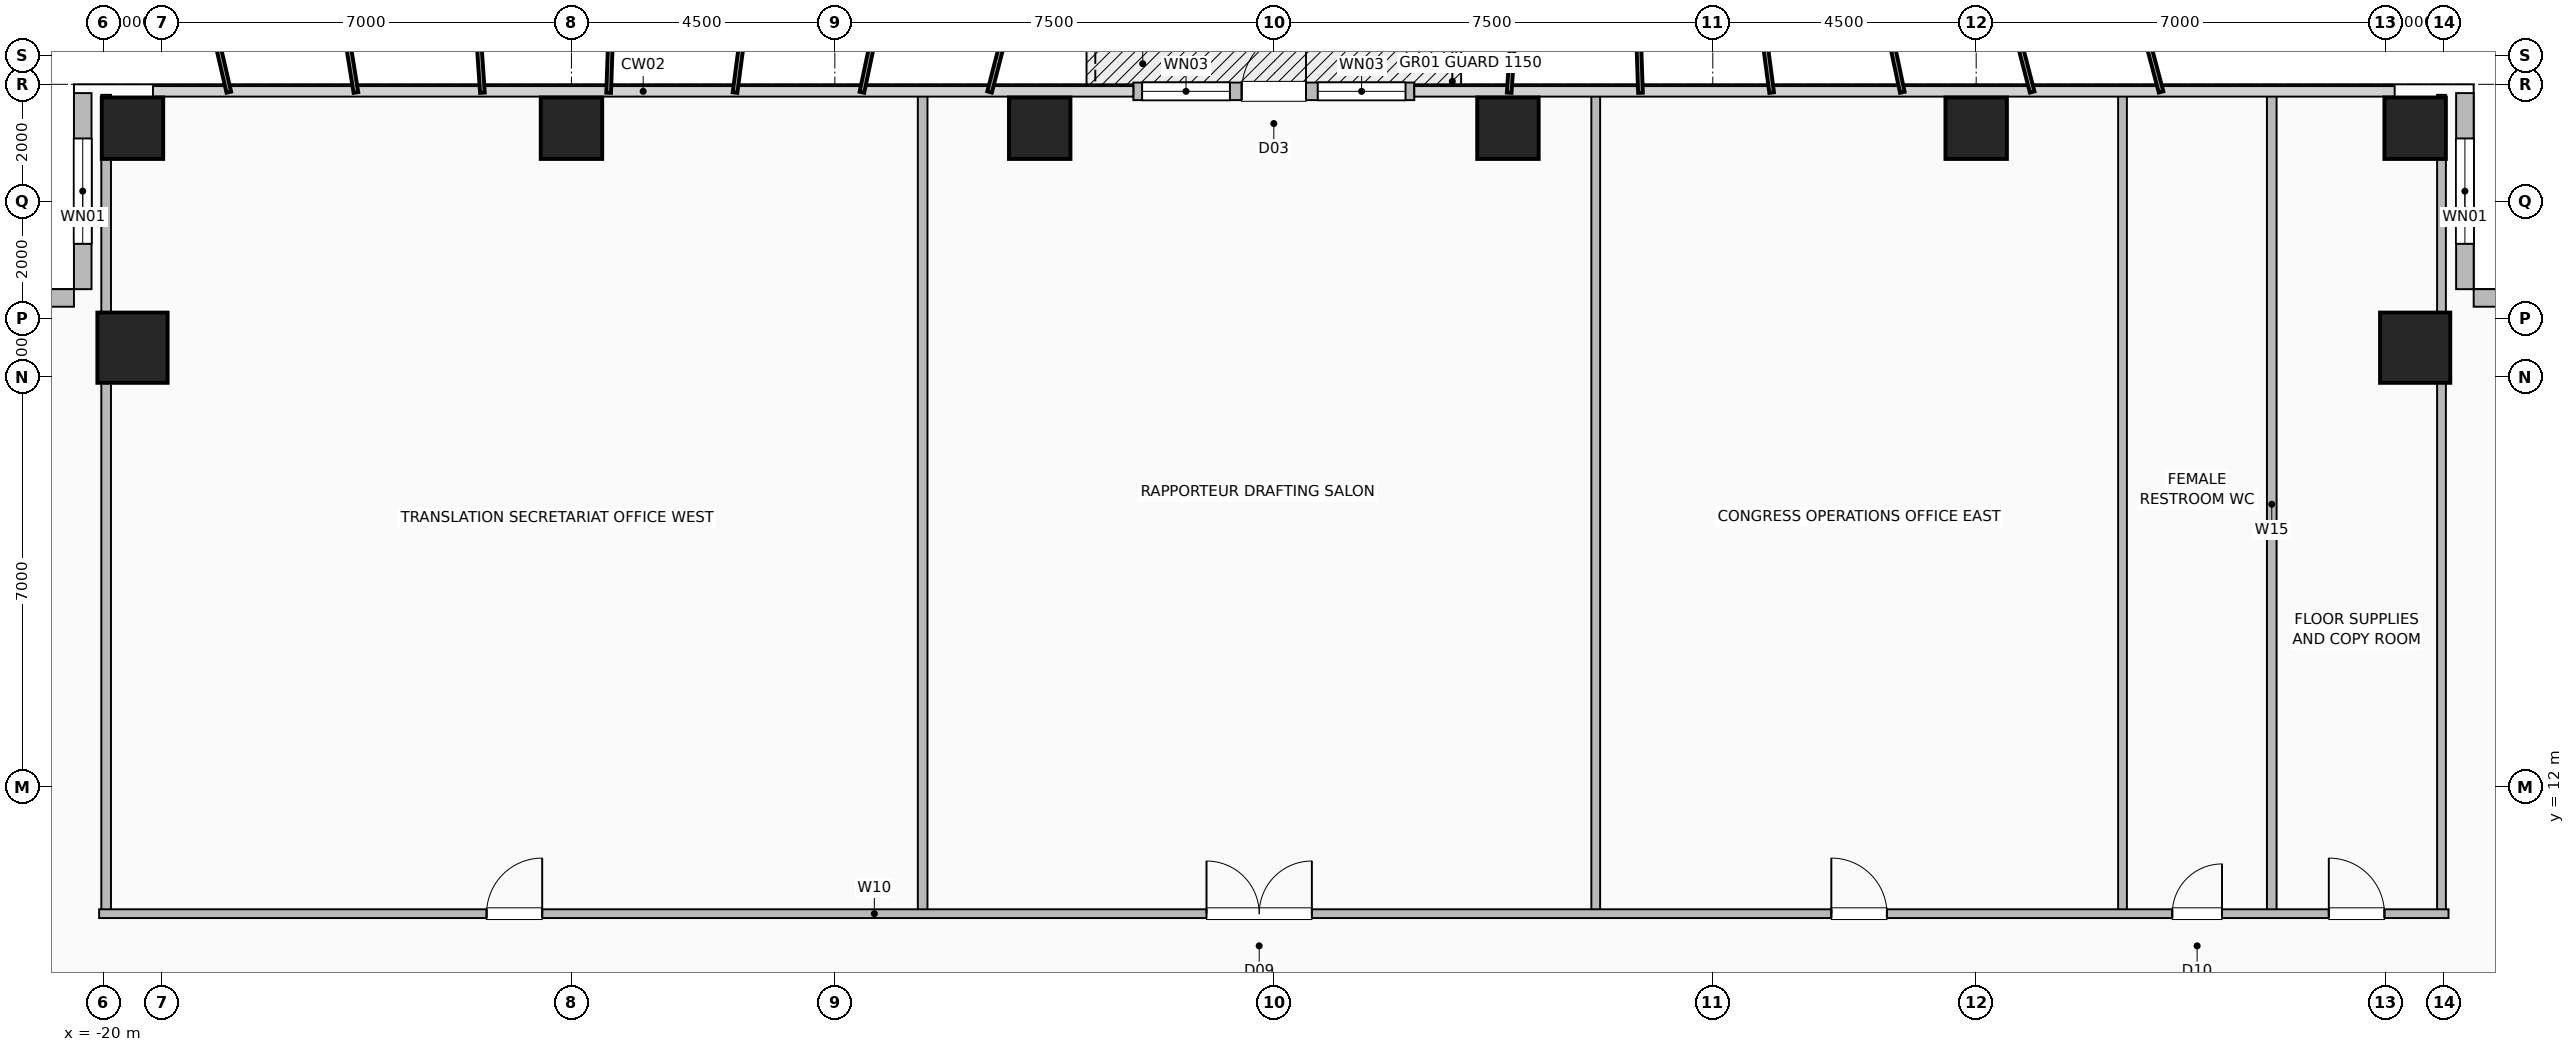
"""IFC4 building model, lengths in metres.
Left out: names, types, materials, properties, quantities, classifications, styles, units other than length and angle.
Written with IfcOpenShell. Run it as: python <this file> out.ifc"""

import sys

from ifc_helpers import new_model, si_unit, direction, frame, frame_2d, origin, origin_2d, place, context, subcontext, project, spatial, rectangle, hollow_rectangle, extrude, element, fill, save


model = new_model("IFC4")
c1 = context("Model", 3, precision=1e-05, world=origin(), true_north=direction((0.0, 1.0)))
c2 = subcontext(c1, "Body", "Model", "MODEL_VIEW")
j1 = project(units=[si_unit("LENGTHUNIT", "METRE"), si_unit("PLANEANGLEUNIT", "RADIAN")], contexts=[c1])
p1 = place(None, origin())
s1 = spatial("IfcSite", under=j1, at=p1, CompositionType="ELEMENT")
p2 = place(p1, origin())
s2 = spatial("IfcBuilding", under=s1, at=p2, CompositionType="ELEMENT")
p3 = place(p2, frame((0.0, 0.0, 37.5)))
s3 = spatial("IfcBuildingStorey", under=s2, at=p3, CompositionType="ELEMENT", Elevation=37.5)
for number, where, z_axis, x_axis in (
    (1, (-19.5, 23.25, 0.0), (0.0, 0.0, 1.0), (1.0, 0.0, 0.0)),
    (2, (-12.0, 23.25, 0.0), (0.0, 0.0, 1.0), (1.0, 0.0, 0.0)),
    (3, (-4.0, 23.25, 0.0), (0.0, 0.0, 1.0), (1.0, 0.0, 0.0)),
    (4, (4.0, 23.25, 0.0), (0.0, 0.0, 1.0), (1.0, 0.0, 0.0)),
    (5, (12.0, 23.25, 0.0), (0.0, 0.0, 1.0), (1.0, 0.0, 0.0)),
    (6, (19.5, 23.25, 0.0), (0.0, 0.0, 1.0), (1.0, 0.0, 0.0)),
):
    element("IfcColumn", number, at=place(p3, frame(where, z_axis=z_axis, x_axis=x_axis)), inside=s3, PredefinedType="COLUMN", context=c2, shape_type="SweptSolid", body=[
        extrude(hollow_rectangle(XDim=1.05, YDim=1.05, WallThickness=0.05, at=origin_2d()), origin(), (0.0, 0.0, 1.0), 3.5),
    ])
for number, where, z_axis, x_axis in (
    (7, (19.5, 19.5, 0.0), (0.0, 0.0, 1.0), (1.0, 0.0, 0.0)),
    (8, (-19.5, 19.5, 0.0), (0.0, 0.0, 1.0), (1.0, 0.0, 0.0)),
):
    element("IfcColumn", number, at=place(p3, frame(where, z_axis=z_axis, x_axis=x_axis)), inside=s3, PredefinedType="COLUMN", context=c2, shape_type="SweptSolid", body=[
        extrude(hollow_rectangle(XDim=1.2, YDim=1.2, WallThickness=0.055, at=origin_2d()), origin(), (0.0, 0.0, 1.0), 3.5),
    ])
p4 = place(p3, frame((-2.4, 23.88, 0.0), z_axis=(0.0, 0.0, 1.0), x_axis=(1.0, 0.0, 0.0)))
e9 = element("IfcWall", 9, at=p4, inside=s3, PredefinedType="SOLIDWALL", context=c2, shape_type="SweptSolid", body=[
    extrude(rectangle(XDim=4.8, YDim=0.3, at=frame_2d((2.4, 0.0))), origin(), (0.0, 0.0, 1.0), 3.25),
])
p5 = place(p4, frame((1.85, 0.0, 0.0)))
e10 = element("IfcOpeningElement", 10, at=p5, cuts=e9, PredefinedType="OPENING", context=c2, shape_type="SweptSolid", body=[
    extrude(rectangle(XDim=1.1, YDim=2.2, at=frame_2d((0.55, 1.1))), frame((0.0, 0.16, 0.0), z_axis=(0.0, -1.0, 0.0), x_axis=(1.0, 0.0, 0.0)), (0.0, 0.0, 1.0), 0.32),
])
p6 = place(p4, frame((0.15, 0.0, 0.85)))
e11 = element("IfcOpeningElement", 11, at=p6, cuts=e9, PredefinedType="OPENING", context=c2, shape_type="SweptSolid", body=[
    extrude(rectangle(XDim=1.5, YDim=1.8, at=frame_2d((0.75, 0.9))), frame((0.0, 0.16, 0.0), z_axis=(0.0, -1.0, 0.0), x_axis=(1.0, 0.0, 0.0)), (0.0, 0.0, 1.0), 0.32),
])
p7 = place(p4, frame((3.15, 0.0, 0.85)))
e12 = element("IfcOpeningElement", 12, at=p7, cuts=e9, PredefinedType="OPENING", context=c2, shape_type="SweptSolid", body=[
    extrude(rectangle(XDim=1.5, YDim=1.8, at=frame_2d((0.75, 0.9))), frame((0.0, 0.16, 0.0), z_axis=(0.0, -1.0, 0.0), x_axis=(1.0, 0.0, 0.0)), (0.0, 0.0, 1.0), 0.32),
])
p8 = place(p3, frame((20.35, 23.85, 0.0), z_axis=(0.0, 0.0, 1.0), x_axis=(0.0, -1.0, 0.0)))
e13 = element("IfcWall", 13, at=p8, inside=s3, PredefinedType="SOLIDWALL", context=c2, shape_type="SweptSolid", body=[
    extrude(rectangle(XDim=3.35, YDim=0.3, at=frame_2d((1.675, 0.0))), origin(), (0.0, 0.0, 1.0), 3.25),
])
p9 = place(p8, frame((0.775, 0.0, 0.9)))
e14 = element("IfcOpeningElement", 14, at=p9, cuts=e13, PredefinedType="OPENING", context=c2, shape_type="SweptSolid", body=[
    extrude(rectangle(XDim=1.8, YDim=1.8, at=frame_2d((0.9, 0.9))), frame((0.0, 0.16, 0.0), z_axis=(0.0, -1.0, 0.0), x_axis=(1.0, 0.0, 0.0)), (0.0, 0.0, 1.0), 0.32),
])
p10 = place(p3, frame((23.85, 20.35, 0.0), z_axis=(0.0, 0.0, 1.0), x_axis=(-1.0, 0.0, 0.0)))
e15 = element("IfcWall", 15, at=p10, inside=s3, PredefinedType="SOLIDWALL", context=c2, shape_type="SweptSolid", body=[
    extrude(rectangle(XDim=3.35, YDim=0.3, at=frame_2d((1.675, 0.0))), origin(), (0.0, 0.0, 1.0), 3.25),
])
p11 = place(p3, frame((-20.35, 23.85, 0.0), z_axis=(0.0, 0.0, 1.0), x_axis=(0.0, -1.0, 0.0)))
e16 = element("IfcWall", 16, at=p11, inside=s3, PredefinedType="SOLIDWALL", context=c2, shape_type="SweptSolid", body=[
    extrude(rectangle(XDim=3.35, YDim=0.3, at=frame_2d((1.675, 0.0))), origin(), (0.0, 0.0, 1.0), 3.25),
])
p12 = place(p11, frame((0.775, 0.0, 0.9)))
e17 = element("IfcOpeningElement", 17, at=p12, cuts=e16, PredefinedType="OPENING", context=c2, shape_type="SweptSolid", body=[
    extrude(rectangle(XDim=1.8, YDim=1.8, at=frame_2d((0.9, 0.9))), frame((0.0, 0.16, 0.0), z_axis=(0.0, -1.0, 0.0), x_axis=(1.0, 0.0, 0.0)), (0.0, 0.0, 1.0), 0.32),
])
p13 = place(p3, frame((-23.85, 20.35, 0.0), z_axis=(0.0, 0.0, 1.0), x_axis=(1.0, 0.0, 0.0)))
e18 = element("IfcWall", 18, at=p13, inside=s3, PredefinedType="SOLIDWALL", context=c2, shape_type="SweptSolid", body=[
    extrude(rectangle(XDim=3.35, YDim=0.3, at=frame_2d((1.675, 0.0))), origin(), (0.0, 0.0, 1.0), 3.25),
])
for number, where, z_axis, x_axis in (
    (19, (17.05, 9.83, 0.0), (0.0, 0.0, 1.0), (0.0, 1.0, 0.0)),
    (20, (-19.95, 9.83, 0.0), (0.0, 0.0, 1.0), (0.0, 1.0, 0.0)),
    (21, (-6.0, 9.83, 0.0), (0.0, 0.0, 1.0), (0.0, 1.0, 0.0)),
):
    element("IfcWall", number, at=place(p3, frame(where, z_axis=z_axis, x_axis=x_axis)), inside=s3, PredefinedType="PLUMBINGWALL", context=c2, shape_type="SweptSolid", body=[
        extrude(rectangle(XDim=13.99, YDim=0.165, at=frame_2d((6.995, 0.0))), origin(), (0.0, 0.0, 1.0), 3.25),
    ])
for number, where, z_axis, x_axis in (
    (22, (5.5, 9.83, 0.0), (0.0, 0.0, 1.0), (0.0, 1.0, 0.0)),
    (23, (14.5, 9.83, 0.0), (0.0, 0.0, 1.0), (0.0, 1.0, 0.0)),
    (24, (19.95, 9.83, 0.0), (0.0, 0.0, 1.0), (0.0, 1.0, 0.0)),
):
    element("IfcWall", number, at=place(p3, frame(where, z_axis=z_axis, x_axis=x_axis)), inside=s3, PredefinedType="PARTITIONING", context=c2, shape_type="SweptSolid", body=[
        extrude(rectangle(XDim=13.99, YDim=0.15, at=frame_2d((6.995, 0.0))), origin(), (0.0, 0.0, 1.0), 3.25),
    ])
p14 = place(p3, frame((-20.07, 9.83, 0.0), z_axis=(0.0, 0.0, 1.0), x_axis=(1.0, 0.0, 0.0)))
e25 = element("IfcWall", 25, at=p14, inside=s3, PredefinedType="PARTITIONING", context=c2, shape_type="SweptSolid", body=[
    extrude(rectangle(XDim=40.14, YDim=0.15, at=frame_2d((20.07, 0.0))), origin(), (0.0, 0.0, 1.0), 3.25),
])
p15 = place(p14, frame((6.62, 0.0, 0.0)))
e26 = element("IfcOpeningElement", 26, at=p15, cuts=e25, PredefinedType="OPENING", context=c2, shape_type="SweptSolid", body=[
    extrude(rectangle(XDim=0.95, YDim=2.06, at=frame_2d((0.475, 1.03))), frame((0.0, 0.085, 0.0), z_axis=(0.0, -1.0, 0.0), x_axis=(1.0, 0.0, 0.0)), (0.0, 0.0, 1.0), 0.17),
])
p16 = place(p14, frame((18.92, 0.0, 0.0)))
e27 = element("IfcOpeningElement", 27, at=p16, cuts=e25, PredefinedType="OPENING", context=c2, shape_type="SweptSolid", body=[
    extrude(rectangle(XDim=1.8, YDim=2.08, at=frame_2d((0.9, 1.04))), frame((0.0, 0.085, 0.0), z_axis=(0.0, -1.0, 0.0), x_axis=(1.0, 0.0, 0.0)), (0.0, 0.0, 1.0), 0.17),
])
p17 = place(p14, frame((29.595, 0.0, 0.0)))
e28 = element("IfcOpeningElement", 28, at=p17, cuts=e25, PredefinedType="OPENING", context=c2, shape_type="SweptSolid", body=[
    extrude(rectangle(XDim=0.95, YDim=2.06, at=frame_2d((0.475, 1.03))), frame((0.0, 0.085, 0.0), z_axis=(0.0, -1.0, 0.0), x_axis=(1.0, 0.0, 0.0)), (0.0, 0.0, 1.0), 0.17),
])
p18 = place(p14, frame((35.42, 0.0, 0.0)))
e29 = element("IfcOpeningElement", 29, at=p18, cuts=e25, PredefinedType="OPENING", context=c2, shape_type="SweptSolid", body=[
    extrude(rectangle(XDim=0.85, YDim=2.05, at=frame_2d((0.425, 1.025))), frame((0.0, 0.085, 0.0), z_axis=(0.0, -1.0, 0.0), x_axis=(1.0, 0.0, 0.0)), (0.0, 0.0, 1.0), 0.17),
])
p19 = place(p14, frame((38.095, 0.0, 0.0)))
e30 = element("IfcOpeningElement", 30, at=p19, cuts=e25, PredefinedType="OPENING", context=c2, shape_type="SweptSolid", body=[
    extrude(rectangle(XDim=0.95, YDim=2.06, at=frame_2d((0.475, 1.03))), frame((0.0, 0.085, 0.0), z_axis=(0.0, -1.0, 0.0), x_axis=(1.0, 0.0, 0.0)), (0.0, 0.0, 1.0), 0.17),
])
p20 = place(p5, origin())
e31 = element("IfcDoor", 31, at=p20, inside=s3, OperationType="SINGLE_SWING_RIGHT", PredefinedType="DOOR", context=c2, shape_type="SweptSolid", body=[
    extrude(rectangle(XDim=1.1, YDim=2.2, at=frame_2d((0.55, 1.1))), frame((0.0, 0.025, 0.0), z_axis=(0.0, -1.0, 0.0), x_axis=(1.0, 0.0, 0.0)), (0.0, 0.0, 1.0), 0.05),
])
fill(e10, e31)
p21 = place(p6, origin())
e32 = element("IfcWindow", 32, at=p21, inside=s3, PartitioningType="SINGLE_PANEL", PredefinedType="WINDOW", context=c2, shape_type="SweptSolid", body=[
    extrude(rectangle(XDim=1.5, YDim=1.8, at=frame_2d((0.75, 0.9))), frame((0.0, 0.03, 0.0), z_axis=(0.0, -1.0, 0.0), x_axis=(1.0, 0.0, 0.0)), (0.0, 0.0, 1.0), 0.06),
])
fill(e11, e32)
p22 = place(p7, origin())
e33 = element("IfcWindow", 33, at=p22, inside=s3, PartitioningType="SINGLE_PANEL", PredefinedType="WINDOW", context=c2, shape_type="SweptSolid", body=[
    extrude(rectangle(XDim=1.5, YDim=1.8, at=frame_2d((0.75, 0.9))), frame((0.0, 0.03, 0.0), z_axis=(0.0, -1.0, 0.0), x_axis=(1.0, 0.0, 0.0)), (0.0, 0.0, 1.0), 0.06),
])
fill(e12, e33)
p23 = place(p9, origin())
e34 = element("IfcWindow", 34, at=p23, inside=s3, PartitioningType="SINGLE_PANEL", PredefinedType="WINDOW", context=c2, shape_type="SweptSolid", body=[
    extrude(rectangle(XDim=1.8, YDim=1.8, at=frame_2d((0.9, 0.9))), frame((0.0, 0.03, 0.0), z_axis=(0.0, -1.0, 0.0), x_axis=(1.0, 0.0, 0.0)), (0.0, 0.0, 1.0), 0.06),
])
fill(e14, e34)
p24 = place(p12, origin())
e35 = element("IfcWindow", 35, at=p24, inside=s3, PartitioningType="SINGLE_PANEL", PredefinedType="WINDOW", context=c2, shape_type="SweptSolid", body=[
    extrude(rectangle(XDim=1.8, YDim=1.8, at=frame_2d((0.9, 0.9))), frame((0.0, 0.03, 0.0), z_axis=(0.0, -1.0, 0.0), x_axis=(1.0, 0.0, 0.0)), (0.0, 0.0, 1.0), 0.06),
])
fill(e17, e35)
p25 = place(p15, origin())
e36 = element("IfcDoor", 36, at=p25, inside=s3, OperationType="SINGLE_SWING_RIGHT", PredefinedType="DOOR", context=c2, shape_type="SweptSolid", body=[
    extrude(rectangle(XDim=0.95, YDim=2.06, at=frame_2d((0.475, 1.03))), frame((0.0, 0.025, 0.0), z_axis=(0.0, -1.0, 0.0), x_axis=(1.0, 0.0, 0.0)), (0.0, 0.0, 1.0), 0.05),
])
fill(e26, e36)
p26 = place(p16, origin())
e37 = element("IfcDoor", 37, at=p26, inside=s3, OperationType="DOUBLE_DOOR_SINGLE_SWING", PredefinedType="DOOR", context=c2, shape_type="SweptSolid", body=[
    extrude(rectangle(XDim=1.8, YDim=2.08, at=frame_2d((0.9, 1.04))), frame((0.0, 0.025, 0.0), z_axis=(0.0, -1.0, 0.0), x_axis=(1.0, 0.0, 0.0)), (0.0, 0.0, 1.0), 0.05),
])
fill(e27, e37)
p27 = place(p17, origin())
e38 = element("IfcDoor", 38, at=p27, inside=s3, OperationType="SINGLE_SWING_LEFT", PredefinedType="DOOR", context=c2, shape_type="SweptSolid", body=[
    extrude(rectangle(XDim=0.95, YDim=2.06, at=frame_2d((0.475, 1.03))), frame((0.0, 0.025, 0.0), z_axis=(0.0, -1.0, 0.0), x_axis=(1.0, 0.0, 0.0)), (0.0, 0.0, 1.0), 0.05),
])
fill(e28, e38)
p28 = place(p18, origin())
e39 = element("IfcDoor", 39, at=p28, inside=s3, OperationType="SINGLE_SWING_RIGHT", PredefinedType="DOOR", context=c2, shape_type="SweptSolid", body=[
    extrude(rectangle(XDim=0.85, YDim=2.05, at=frame_2d((0.425, 1.025))), frame((0.0, 0.025, 0.0), z_axis=(0.0, -1.0, 0.0), x_axis=(1.0, 0.0, 0.0)), (0.0, 0.0, 1.0), 0.05),
])
fill(e29, e39)
p29 = place(p19, origin())
e40 = element("IfcDoor", 40, at=p29, inside=s3, OperationType="SINGLE_SWING_LEFT", PredefinedType="DOOR", context=c2, shape_type="SweptSolid", body=[
    extrude(rectangle(XDim=0.95, YDim=2.06, at=frame_2d((0.475, 1.03))), frame((0.0, 0.025, 0.0), z_axis=(0.0, -1.0, 0.0), x_axis=(1.0, 0.0, 0.0)), (0.0, 0.0, 1.0), 0.05),
])
fill(e30, e40)
save(model, sys.argv[1])
